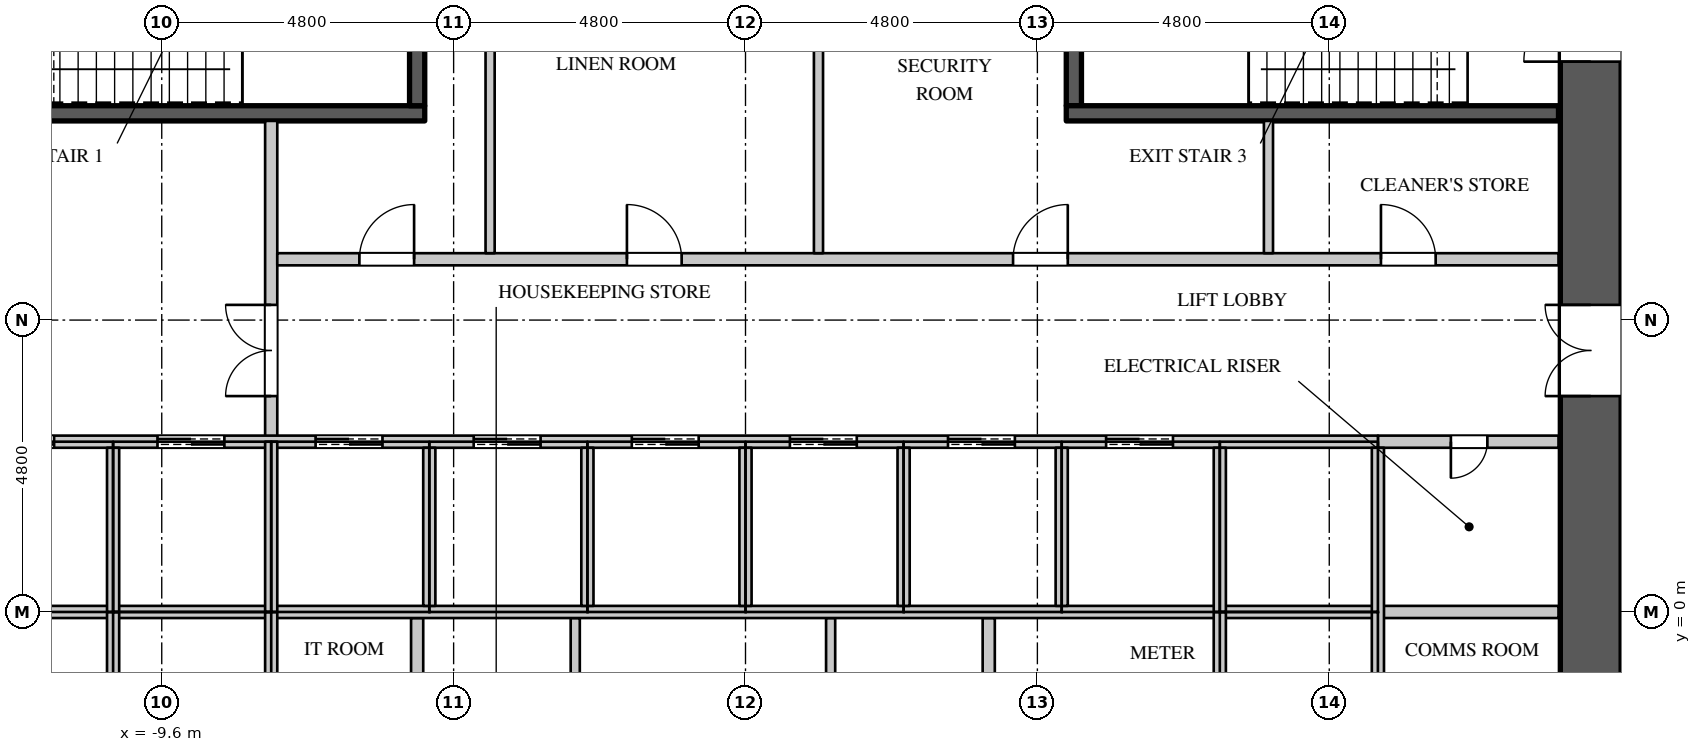
"""IFC4 building model, lengths in metres.
Left out: names, types, materials, properties, quantities, classifications, styles, units other than length and angle.
Written with IfcOpenShell. Run it as: python <this file> out.ifc"""

import sys

from ifc_helpers import new_model, si_unit, direction, frame, frame_2d, origin, place, context, subcontext, project, spatial, rectangle, extrude, element, fill, save


model = new_model("IFC4")
c1 = context("Model", 3, precision=1e-05, world=origin(), true_north=direction((0.0, 1.0)))
c2 = subcontext(c1, "Body", "Model", "MODEL_VIEW")
j1 = project(units=[si_unit("LENGTHUNIT", "METRE"), si_unit("PLANEANGLEUNIT", "RADIAN")], contexts=[c1])
p1 = place(None, origin())
s1 = spatial("IfcSite", under=j1, at=p1, CompositionType="ELEMENT")
p2 = place(p1, origin())
s2 = spatial("IfcBuilding", under=s1, at=p2, CompositionType="ELEMENT")
p3 = place(p2, frame((0.0, 0.0, 71.7)))
s3 = spatial("IfcBuildingStorey", under=s2, at=p3, CompositionType="ELEMENT", Elevation=71.7)
p4 = place(p3, frame((13.9, -11.0, 0.0), z_axis=(0.0, 0.0, 1.0), x_axis=(0.0, 1.0, 0.0)))
e1 = element("IfcWall", 1, at=p4, inside=s3, PredefinedType="SHEAR", context=c2, shape_type="SweptSolid", body=[
    extrude(rectangle(XDim=22.0, YDim=1.0, at=frame_2d((11.0, 0.0))), origin(), (0.0, 0.0, 1.0), 4.2),
])
p5 = place(p4, frame((20.05, 0.0, 0.0)))
e2 = element("IfcOpeningElement", 2, at=p5, cuts=e1, PredefinedType="OPENING", context=c2, shape_type="SweptSolid", body=[
    extrude(rectangle(XDim=1.1, YDim=2.2, at=frame_2d((0.55, 1.1))), frame((0.0, 0.51, 0.0), z_axis=(0.0, -1.0, 0.0), x_axis=(1.0, 0.0, 0.0)), (0.0, 0.0, 1.0), 1.02),
])
p6 = place(p4, frame((0.85, 0.0, 0.0)))
e3 = element("IfcOpeningElement", 3, at=p6, cuts=e1, PredefinedType="OPENING", context=c2, shape_type="SweptSolid", body=[
    extrude(rectangle(XDim=1.1, YDim=2.2, at=frame_2d((0.55, 1.1))), frame((0.0, 0.51, 0.0), z_axis=(0.0, -1.0, 0.0), x_axis=(1.0, 0.0, 0.0)), (0.0, 0.0, 1.0), 1.02),
])
p7 = place(p4, frame((14.55, 0.0, 0.0)))
e4 = element("IfcOpeningElement", 4, at=p7, cuts=e1, PredefinedType="OPENING", context=c2, shape_type="SweptSolid", body=[
    extrude(rectangle(XDim=1.5, YDim=2.4, at=frame_2d((0.75, 1.2))), frame((0.0, 0.51, 0.0), z_axis=(0.0, -1.0, 0.0), x_axis=(1.0, 0.0, 0.0)), (0.0, 0.0, 1.0), 1.02),
])
p8 = place(p4, frame((5.95, 0.0, 0.0)))
e5 = element("IfcOpeningElement", 5, at=p8, cuts=e1, PredefinedType="OPENING", context=c2, shape_type="SweptSolid", body=[
    extrude(rectangle(XDim=1.5, YDim=2.4, at=frame_2d((0.75, 1.2))), frame((0.0, 0.51, 0.0), z_axis=(0.0, -1.0, 0.0), x_axis=(1.0, 0.0, 0.0)), (0.0, 0.0, 1.0), 1.02),
])
p9 = place(p3, frame((-7.8, 2.8, 0.0), z_axis=(0.0, 0.0, 1.0), x_axis=(0.0, 1.0, 0.0)))
e6 = element("IfcWall", 6, at=p9, inside=s3, PredefinedType="PARTITIONING", context=c2, shape_type="SweptSolid", body=[
    extrude(rectangle(XDim=5.275, YDim=0.2, at=frame_2d((2.637, 0.0))), origin(), (0.0, 0.0, 1.0), 3.95),
])
p10 = place(p9, frame((0.75, 0.0, 0.0)))
e7 = element("IfcOpeningElement", 7, at=p10, cuts=e6, PredefinedType="OPENING", context=c2, shape_type="SweptSolid", body=[
    extrude(rectangle(XDim=1.5, YDim=2.4, at=frame_2d((0.75, 1.2))), frame((0.0, 0.11, 0.0), z_axis=(0.0, -1.0, 0.0), x_axis=(1.0, 0.0, 0.0)), (0.0, 0.0, 1.0), 0.22),
])
p11 = place(p3, frame((-7.7, 5.8, 0.0), z_axis=(0.0, 0.0, 1.0), x_axis=(1.0, 0.0, 0.0)))
e8 = element("IfcWall", 8, at=p11, inside=s3, PredefinedType="PARTITIONING", context=c2, shape_type="SweptSolid", body=[
    extrude(rectangle(XDim=21.07, YDim=0.2, at=frame_2d((10.535, 0.0))), origin(), (0.0, 0.0, 1.0), 3.95),
])
p12 = place(p11, frame((1.35, 0.0, 0.0)))
e9 = element("IfcOpeningElement", 9, at=p12, cuts=e8, PredefinedType="OPENING", context=c2, shape_type="SweptSolid", body=[
    extrude(rectangle(XDim=0.9, YDim=2.2, at=frame_2d((0.45, 1.1))), frame((0.0, 0.11, 0.0), z_axis=(0.0, -1.0, 0.0), x_axis=(1.0, 0.0, 0.0)), (0.0, 0.0, 1.0), 0.22),
])
p13 = place(p11, frame((5.75, 0.0, 0.0)))
e10 = element("IfcOpeningElement", 10, at=p13, cuts=e8, PredefinedType="OPENING", context=c2, shape_type="SweptSolid", body=[
    extrude(rectangle(XDim=0.9, YDim=2.2, at=frame_2d((0.45, 1.1))), frame((0.0, 0.11, 0.0), z_axis=(0.0, -1.0, 0.0), x_axis=(1.0, 0.0, 0.0)), (0.0, 0.0, 1.0), 0.22),
])
p14 = place(p11, frame((12.1, 0.0, 0.0)))
e11 = element("IfcOpeningElement", 11, at=p14, cuts=e8, PredefinedType="OPENING", context=c2, shape_type="SweptSolid", body=[
    extrude(rectangle(XDim=0.9, YDim=2.2, at=frame_2d((0.45, 1.1))), frame((0.0, 0.11, 0.0), z_axis=(0.0, -1.0, 0.0), x_axis=(1.0, 0.0, 0.0)), (0.0, 0.0, 1.0), 0.22),
])
p15 = place(p11, frame((18.15, 0.0, 0.0)))
e12 = element("IfcOpeningElement", 12, at=p15, cuts=e8, PredefinedType="OPENING", context=c2, shape_type="SweptSolid", body=[
    extrude(rectangle(XDim=0.9, YDim=2.2, at=frame_2d((0.45, 1.1))), frame((0.0, 0.11, 0.0), z_axis=(0.0, -1.0, 0.0), x_axis=(1.0, 0.0, 0.0)), (0.0, 0.0, 1.0), 0.22),
])
p16 = place(p3, frame((-4.2, 5.9, 0.0), z_axis=(0.0, 0.0, 1.0), x_axis=(0.0, 1.0, 0.0)))
e13 = element("IfcWall", 13, at=p16, inside=s3, PredefinedType="PARTITIONING", context=c2, shape_type="SweptSolid", body=[
    extrude(rectangle(XDim=5.07, YDim=0.15, at=frame_2d((2.535, 0.0))), origin(), (0.0, 0.0, 1.0), 3.95),
])
p17 = place(p3, frame((-2.8, -2.7, 0.0), z_axis=(0.0, 0.0, 1.0), x_axis=(0.0, 1.0, 0.0)))
e14 = element("IfcWall", 14, at=p17, inside=s3, PredefinedType="PARTITIONING", context=c2, shape_type="SweptSolid", body=[
    extrude(rectangle(XDim=2.6, YDim=0.15, at=frame_2d((1.3, 0.0))), origin(), (0.0, 0.0, 1.0), 3.95),
])
p18 = place(p3, frame((1.2, 5.9, 0.0), z_axis=(0.0, 0.0, 1.0), x_axis=(0.0, 1.0, 0.0)))
e15 = element("IfcWall", 15, at=p18, inside=s3, PredefinedType="PARTITIONING", context=c2, shape_type="SweptSolid", body=[
    extrude(rectangle(XDim=5.07, YDim=0.15, at=frame_2d((2.535, 0.0))), origin(), (0.0, 0.0, 1.0), 3.95),
])
p19 = place(p3, frame((1.4, -2.7, 0.0), z_axis=(0.0, 0.0, 1.0), x_axis=(0.0, 1.0, 0.0)))
e16 = element("IfcWall", 16, at=p19, inside=s3, PredefinedType="PARTITIONING", context=c2, shape_type="SweptSolid", body=[
    extrude(rectangle(XDim=2.6, YDim=0.15, at=frame_2d((1.3, 0.0))), origin(), (0.0, 0.0, 1.0), 3.95),
])
p20 = place(p3, frame((8.6, 5.9, 0.0), z_axis=(0.0, 0.0, 1.0), x_axis=(0.0, 1.0, 0.0)))
e17 = element("IfcWall", 17, at=p20, inside=s3, PredefinedType="PARTITIONING", context=c2, shape_type="SweptSolid", body=[
    extrude(rectangle(XDim=2.175, YDim=0.15, at=frame_2d((1.087, 0.0))), origin(), (0.0, 0.0, 1.0), 3.95),
])
for number, where, z_axis, x_axis in (
    (18, (-5.4, -2.7, 0.0), (0.0, 0.0, 1.0), (0.0, 1.0, 0.0)),
    (19, (4.0, -2.7, 0.0), (0.0, 0.0, 1.0), (0.0, 1.0, 0.0)),
):
    element("IfcWall", number, at=place(p3, frame(where, z_axis=z_axis, x_axis=x_axis)), inside=s3, PredefinedType="PARTITIONING", context=c2, shape_type="SweptSolid", body=[
        extrude(rectangle(XDim=2.6, YDim=0.2, at=frame_2d((1.3, 0.0))), origin(), (0.0, 0.0, 1.0), 3.95),
    ])
p21 = place(p3, frame((10.4, 2.8, 0.0), z_axis=(0.0, 0.0, 1.0), x_axis=(1.0, 0.0, 0.0)))
e20 = element("IfcWall", 20, at=p21, inside=s3, PredefinedType="PARTITIONING", context=c2, shape_type="SweptSolid", body=[
    extrude(rectangle(XDim=2.97, YDim=0.2, at=frame_2d((1.485, 0.0))), origin(), (0.0, 0.0, 1.0), 3.95),
])
p22 = place(p21, frame((1.2, 0.0, 0.0)))
e21 = element("IfcOpeningElement", 21, at=p22, cuts=e20, PredefinedType="OPENING", context=c2, shape_type="SweptSolid", body=[
    extrude(rectangle(XDim=0.6, YDim=2.0, at=frame_2d((0.3, 1.0))), frame((0.0, 0.11, 0.0), z_axis=(0.0, -1.0, 0.0), x_axis=(1.0, 0.0, 0.0)), (0.0, 0.0, 1.0), 0.22),
])
p23 = place(p3, frame((10.4, 0.0, 0.0), z_axis=(0.0, 0.0, 1.0), x_axis=(1.0, 0.0, 0.0)))
e22 = element("IfcWall", 22, at=p23, inside=s3, PredefinedType="PARTITIONING", context=c2, shape_type="SweptSolid", body=[
    extrude(rectangle(XDim=2.97, YDim=0.2, at=frame_2d((1.485, 0.0))), origin(), (0.0, 0.0, 1.0), 3.95),
])
p24 = place(p3, frame((-13.37, 0.0, 0.0), z_axis=(0.0, 0.0, 1.0), x_axis=(1.0, 0.0, 0.0)))
e23 = element("IfcWall", 23, at=p24, inside=s3, PredefinedType="PARTITIONING", context=c2, shape_type="SweptSolid", body=[
    extrude(rectangle(XDim=23.77, YDim=0.2, at=frame_2d((11.885, 0.0))), origin(), (0.0, 0.0, 1.0), 3.95),
])
p25 = place(p3, frame((-13.37, 2.8, 0.0), z_axis=(0.0, 0.0, 1.0), x_axis=(1.0, 0.0, 0.0)))
e24 = element("IfcWall", 24, at=p25, inside=s3, PredefinedType="PARTITIONING", context=c2, shape_type="SweptSolid", body=[
    extrude(rectangle(XDim=23.77, YDim=0.2, at=frame_2d((11.885, 0.0))), origin(), (0.0, 0.0, 1.0), 3.95),
])
p26 = place(p25, frame((0.9, 0.0, 0.0)))
e25 = element("IfcOpeningElement", 25, at=p26, cuts=e24, PredefinedType="OPENING", context=c2, shape_type="SweptSolid", body=[
    extrude(rectangle(XDim=1.1, YDim=2.2, at=frame_2d((0.55, 1.1))), frame((0.0, 0.11, 0.0), z_axis=(0.0, -1.0, 0.0), x_axis=(1.0, 0.0, 0.0)), (0.0, 0.0, 1.0), 0.22),
])
p27 = place(p25, frame((3.7, 0.0, 0.0)))
e26 = element("IfcOpeningElement", 26, at=p27, cuts=e24, PredefinedType="OPENING", context=c2, shape_type="SweptSolid", body=[
    extrude(rectangle(XDim=1.1, YDim=2.2, at=frame_2d((0.55, 1.1))), frame((0.0, 0.11, 0.0), z_axis=(0.0, -1.0, 0.0), x_axis=(1.0, 0.0, 0.0)), (0.0, 0.0, 1.0), 0.22),
])
p28 = place(p25, frame((6.3, 0.0, 0.0)))
e27 = element("IfcOpeningElement", 27, at=p28, cuts=e24, PredefinedType="OPENING", context=c2, shape_type="SweptSolid", body=[
    extrude(rectangle(XDim=1.1, YDim=2.2, at=frame_2d((0.55, 1.1))), frame((0.0, 0.11, 0.0), z_axis=(0.0, -1.0, 0.0), x_axis=(1.0, 0.0, 0.0)), (0.0, 0.0, 1.0), 0.22),
])
p29 = place(p25, frame((8.9, 0.0, 0.0)))
e28 = element("IfcOpeningElement", 28, at=p29, cuts=e24, PredefinedType="OPENING", context=c2, shape_type="SweptSolid", body=[
    extrude(rectangle(XDim=1.1, YDim=2.2, at=frame_2d((0.55, 1.1))), frame((0.0, 0.11, 0.0), z_axis=(0.0, -1.0, 0.0), x_axis=(1.0, 0.0, 0.0)), (0.0, 0.0, 1.0), 0.22),
])
p30 = place(p25, frame((11.5, 0.0, 0.0)))
e29 = element("IfcOpeningElement", 29, at=p30, cuts=e24, PredefinedType="OPENING", context=c2, shape_type="SweptSolid", body=[
    extrude(rectangle(XDim=1.1, YDim=2.2, at=frame_2d((0.55, 1.1))), frame((0.0, 0.11, 0.0), z_axis=(0.0, -1.0, 0.0), x_axis=(1.0, 0.0, 0.0)), (0.0, 0.0, 1.0), 0.22),
])
p31 = place(p25, frame((14.1, 0.0, 0.0)))
e30 = element("IfcOpeningElement", 30, at=p31, cuts=e24, PredefinedType="OPENING", context=c2, shape_type="SweptSolid", body=[
    extrude(rectangle(XDim=1.1, YDim=2.2, at=frame_2d((0.55, 1.1))), frame((0.0, 0.11, 0.0), z_axis=(0.0, -1.0, 0.0), x_axis=(1.0, 0.0, 0.0)), (0.0, 0.0, 1.0), 0.22),
])
p32 = place(p25, frame((16.7, 0.0, 0.0)))
e31 = element("IfcOpeningElement", 31, at=p32, cuts=e24, PredefinedType="OPENING", context=c2, shape_type="SweptSolid", body=[
    extrude(rectangle(XDim=1.1, YDim=2.2, at=frame_2d((0.55, 1.1))), frame((0.0, 0.11, 0.0), z_axis=(0.0, -1.0, 0.0), x_axis=(1.0, 0.0, 0.0)), (0.0, 0.0, 1.0), 0.22),
])
p33 = place(p25, frame((19.3, 0.0, 0.0)))
e32 = element("IfcOpeningElement", 32, at=p33, cuts=e24, PredefinedType="OPENING", context=c2, shape_type="SweptSolid", body=[
    extrude(rectangle(XDim=1.1, YDim=2.2, at=frame_2d((0.55, 1.1))), frame((0.0, 0.11, 0.0), z_axis=(0.0, -1.0, 0.0), x_axis=(1.0, 0.0, 0.0)), (0.0, 0.0, 1.0), 0.22),
])
for number, where, z_axis, x_axis in (
    (33, (-10.4, -2.7, 0.0), (0.0, 0.0, 1.0), (0.0, 1.0, 0.0)),
    (34, (-10.4, 0.0, 0.0), (0.0, 0.0, 1.0), (0.0, 1.0, 0.0)),
):
    element("IfcWall", number, at=place(p3, frame(where, z_axis=z_axis, x_axis=x_axis)), inside=s3, PredefinedType="PARTITIONING", context=c2, shape_type="SweptSolid", body=[
        extrude(rectangle(XDim=2.7, YDim=0.2, at=frame_2d((1.35, 0.0))), origin(), (0.0, 0.0, 1.0), 3.95),
    ])
for number, where, z_axis, x_axis in (
    (35, (-7.8, -2.8, 0.0), (0.0, 0.0, 1.0), (0.0, 1.0, 0.0)),
    (36, (-7.8, 0.0, 0.0), (0.0, 0.0, 1.0), (0.0, 1.0, 0.0)),
):
    element("IfcWall", number, at=place(p3, frame(where, z_axis=z_axis, x_axis=x_axis)), inside=s3, PredefinedType="PARTITIONING", context=c2, shape_type="SweptSolid", body=[
        extrude(rectangle(XDim=2.8, YDim=0.2, at=frame_2d((1.4, 0.0))), origin(), (0.0, 0.0, 1.0), 3.95),
    ])
for number, where, z_axis, x_axis in (
    (37, (-5.2, 0.1, 0.0), (0.0, 0.0, 1.0), (0.0, 1.0, 0.0)),
    (38, (-2.6, 0.1, 0.0), (0.0, 0.0, 1.0), (0.0, 1.0, 0.0)),
    (39, (0.0, 0.1, 0.0), (0.0, 0.0, 1.0), (0.0, 1.0, 0.0)),
    (40, (2.6, 0.1, 0.0), (0.0, 0.0, 1.0), (0.0, 1.0, 0.0)),
    (41, (5.2, 0.1, 0.0), (0.0, 0.0, 1.0), (0.0, 1.0, 0.0)),
):
    element("IfcWall", number, at=place(p3, frame(where, z_axis=z_axis, x_axis=x_axis)), inside=s3, PredefinedType="PARTITIONING", context=c2, shape_type="SweptSolid", body=[
        extrude(rectangle(XDim=2.6, YDim=0.2, at=frame_2d((1.3, 0.0))), origin(), (0.0, 0.0, 1.0), 3.95),
    ])
for number, where, z_axis, x_axis in (
    (42, (7.8, -2.7, 0.0), (0.0, 0.0, 1.0), (0.0, 1.0, 0.0)),
    (43, (7.8, 0.0, 0.0), (0.0, 0.0, 1.0), (0.0, 1.0, 0.0)),
):
    element("IfcWall", number, at=place(p3, frame(where, z_axis=z_axis, x_axis=x_axis)), inside=s3, PredefinedType="PARTITIONING", context=c2, shape_type="SweptSolid", body=[
        extrude(rectangle(XDim=2.7, YDim=0.2, at=frame_2d((1.35, 0.0))), origin(), (0.0, 0.0, 1.0), 3.95),
    ])
p34 = place(p3, frame((10.4, -2.7, 0.0), z_axis=(0.0, 0.0, 1.0), x_axis=(0.0, 1.0, 0.0)))
e44 = element("IfcWall", 44, at=p34, inside=s3, PredefinedType="PARTITIONING", context=c2, shape_type="SweptSolid", body=[
    extrude(rectangle(XDim=5.4, YDim=0.2, at=frame_2d((2.7, 0.0))), origin(), (0.0, 0.0, 1.0), 3.95),
])
p35 = place(p3, frame((-13.37, 8.2, 0.0), z_axis=(0.0, 0.0, 1.0), x_axis=(1.0, 0.0, 0.0)))
e45 = element("IfcWall", 45, at=p35, inside=s3, PredefinedType="SHEAR", context=c2, shape_type="SweptSolid", body=[
    extrude(rectangle(XDim=8.095, YDim=0.25, at=frame_2d((4.048, 0.0))), origin(), (0.0, 0.0, 1.0), 3.95),
])
p36 = place(p35, frame((0.15, 0.0, 0.0)))
e46 = element("IfcOpeningElement", 46, at=p36, cuts=e45, PredefinedType="OPENING", context=c2, shape_type="SweptSolid", body=[
    extrude(rectangle(XDim=1.1, YDim=2.2, at=frame_2d((0.55, 1.1))), frame((0.0, 0.135, 0.0), z_axis=(0.0, -1.0, 0.0), x_axis=(1.0, 0.0, 0.0)), (0.0, 0.0, 1.0), 0.27),
])
for number, where, z_axis, x_axis in (
    (47, (-5.4, 8.325, 0.0), (0.0, 0.0, 1.0), (0.0, 1.0, 0.0)),
    (48, (5.4, 8.325, 0.0), (0.0, 0.0, 1.0), (0.0, 1.0, 0.0)),
):
    element("IfcWall", number, at=place(p3, frame(where, z_axis=z_axis, x_axis=x_axis)), inside=s3, PredefinedType="SHEAR", context=c2, shape_type="SweptSolid", body=[
        extrude(rectangle(XDim=2.645, YDim=0.25, at=frame_2d((1.323, 0.0))), origin(), (0.0, 0.0, 1.0), 3.95),
    ])
p37 = place(p3, frame((5.275, 8.2, 0.0), z_axis=(0.0, 0.0, 1.0), x_axis=(1.0, 0.0, 0.0)))
e49 = element("IfcWall", 49, at=p37, inside=s3, PredefinedType="SHEAR", context=c2, shape_type="SweptSolid", body=[
    extrude(rectangle(XDim=8.095, YDim=0.25, at=frame_2d((4.048, 0.0))), origin(), (0.0, 0.0, 1.0), 3.95),
])
p38 = place(p22, origin())
e50 = element("IfcDoor", 50, at=p38, inside=s3, OperationType="SINGLE_SWING_RIGHT", PredefinedType="DOOR", context=c2, shape_type="SweptSolid", body=[
    extrude(rectangle(XDim=0.6, YDim=2.0, at=frame_2d((0.3, 1.0))), frame((0.0, 0.025, 0.0), z_axis=(0.0, -1.0, 0.0), x_axis=(1.0, 0.0, 0.0)), (0.0, 0.0, 1.0), 0.05),
])
fill(e21, e50)
p39 = place(p12, origin())
e51 = element("IfcDoor", 51, at=p39, inside=s3, OperationType="SINGLE_SWING_RIGHT", PredefinedType="DOOR", context=c2, shape_type="SweptSolid", body=[
    extrude(rectangle(XDim=0.9, YDim=2.2, at=frame_2d((0.45, 1.1))), frame((0.0, 0.025, 0.0), z_axis=(0.0, -1.0, 0.0), x_axis=(1.0, 0.0, 0.0)), (0.0, 0.0, 1.0), 0.05),
])
fill(e9, e51)
p40 = place(p13, origin())
e52 = element("IfcDoor", 52, at=p40, inside=s3, OperationType="SINGLE_SWING_LEFT", PredefinedType="DOOR", context=c2, shape_type="SweptSolid", body=[
    extrude(rectangle(XDim=0.9, YDim=2.2, at=frame_2d((0.45, 1.1))), frame((0.0, 0.025, 0.0), z_axis=(0.0, -1.0, 0.0), x_axis=(1.0, 0.0, 0.0)), (0.0, 0.0, 1.0), 0.05),
])
fill(e10, e52)
p41 = place(p14, origin())
e53 = element("IfcDoor", 53, at=p41, inside=s3, OperationType="SINGLE_SWING_RIGHT", PredefinedType="DOOR", context=c2, shape_type="SweptSolid", body=[
    extrude(rectangle(XDim=0.9, YDim=2.2, at=frame_2d((0.45, 1.1))), frame((0.0, 0.025, 0.0), z_axis=(0.0, -1.0, 0.0), x_axis=(1.0, 0.0, 0.0)), (0.0, 0.0, 1.0), 0.05),
])
fill(e11, e53)
p42 = place(p15, origin())
e54 = element("IfcDoor", 54, at=p42, inside=s3, OperationType="SINGLE_SWING_LEFT", PredefinedType="DOOR", context=c2, shape_type="SweptSolid", body=[
    extrude(rectangle(XDim=0.9, YDim=2.2, at=frame_2d((0.45, 1.1))), frame((0.0, 0.025, 0.0), z_axis=(0.0, -1.0, 0.0), x_axis=(1.0, 0.0, 0.0)), (0.0, 0.0, 1.0), 0.05),
])
fill(e12, e54)
p43 = place(p26, origin())
e55 = element("IfcDoor", 55, at=p43, inside=s3, OperationType="DOUBLE_DOOR_SLIDING", PredefinedType="DOOR", context=c2, shape_type="SweptSolid", body=[
    extrude(rectangle(XDim=1.1, YDim=2.2, at=frame_2d((0.55, 1.1))), frame((0.0, 0.025, 0.0), z_axis=(0.0, -1.0, 0.0), x_axis=(1.0, 0.0, 0.0)), (0.0, 0.0, 1.0), 0.05),
])
fill(e25, e55)
p44 = place(p27, origin())
e56 = element("IfcDoor", 56, at=p44, inside=s3, OperationType="DOUBLE_DOOR_SLIDING", PredefinedType="DOOR", context=c2, shape_type="SweptSolid", body=[
    extrude(rectangle(XDim=1.1, YDim=2.2, at=frame_2d((0.55, 1.1))), frame((0.0, 0.025, 0.0), z_axis=(0.0, -1.0, 0.0), x_axis=(1.0, 0.0, 0.0)), (0.0, 0.0, 1.0), 0.05),
])
fill(e26, e56)
p45 = place(p28, origin())
e57 = element("IfcDoor", 57, at=p45, inside=s3, OperationType="DOUBLE_DOOR_SLIDING", PredefinedType="DOOR", context=c2, shape_type="SweptSolid", body=[
    extrude(rectangle(XDim=1.1, YDim=2.2, at=frame_2d((0.55, 1.1))), frame((0.0, 0.025, 0.0), z_axis=(0.0, -1.0, 0.0), x_axis=(1.0, 0.0, 0.0)), (0.0, 0.0, 1.0), 0.05),
])
fill(e27, e57)
p46 = place(p29, origin())
e58 = element("IfcDoor", 58, at=p46, inside=s3, OperationType="DOUBLE_DOOR_SLIDING", PredefinedType="DOOR", context=c2, shape_type="SweptSolid", body=[
    extrude(rectangle(XDim=1.1, YDim=2.2, at=frame_2d((0.55, 1.1))), frame((0.0, 0.025, 0.0), z_axis=(0.0, -1.0, 0.0), x_axis=(1.0, 0.0, 0.0)), (0.0, 0.0, 1.0), 0.05),
])
fill(e28, e58)
p47 = place(p30, origin())
e59 = element("IfcDoor", 59, at=p47, inside=s3, OperationType="DOUBLE_DOOR_SLIDING", PredefinedType="DOOR", context=c2, shape_type="SweptSolid", body=[
    extrude(rectangle(XDim=1.1, YDim=2.2, at=frame_2d((0.55, 1.1))), frame((0.0, 0.025, 0.0), z_axis=(0.0, -1.0, 0.0), x_axis=(1.0, 0.0, 0.0)), (0.0, 0.0, 1.0), 0.05),
])
fill(e29, e59)
p48 = place(p31, origin())
e60 = element("IfcDoor", 60, at=p48, inside=s3, OperationType="DOUBLE_DOOR_SLIDING", PredefinedType="DOOR", context=c2, shape_type="SweptSolid", body=[
    extrude(rectangle(XDim=1.1, YDim=2.2, at=frame_2d((0.55, 1.1))), frame((0.0, 0.025, 0.0), z_axis=(0.0, -1.0, 0.0), x_axis=(1.0, 0.0, 0.0)), (0.0, 0.0, 1.0), 0.05),
])
fill(e30, e60)
p49 = place(p32, origin())
e61 = element("IfcDoor", 61, at=p49, inside=s3, OperationType="DOUBLE_DOOR_SLIDING", PredefinedType="DOOR", context=c2, shape_type="SweptSolid", body=[
    extrude(rectangle(XDim=1.1, YDim=2.2, at=frame_2d((0.55, 1.1))), frame((0.0, 0.025, 0.0), z_axis=(0.0, -1.0, 0.0), x_axis=(1.0, 0.0, 0.0)), (0.0, 0.0, 1.0), 0.05),
])
fill(e31, e61)
p50 = place(p33, origin())
e62 = element("IfcDoor", 62, at=p50, inside=s3, OperationType="DOUBLE_DOOR_SLIDING", PredefinedType="DOOR", context=c2, shape_type="SweptSolid", body=[
    extrude(rectangle(XDim=1.1, YDim=2.2, at=frame_2d((0.55, 1.1))), frame((0.0, 0.025, 0.0), z_axis=(0.0, -1.0, 0.0), x_axis=(1.0, 0.0, 0.0)), (0.0, 0.0, 1.0), 0.05),
])
fill(e32, e62)
p51 = place(p10, origin())
e63 = element("IfcDoor", 63, at=p51, inside=s3, OperationType="DOUBLE_DOOR_SINGLE_SWING", PredefinedType="DOOR", context=c2, shape_type="SweptSolid", body=[
    extrude(rectangle(XDim=1.5, YDim=2.4, at=frame_2d((0.75, 1.2))), frame((0.0, 0.025, 0.0), z_axis=(0.0, -1.0, 0.0), x_axis=(1.0, 0.0, 0.0)), (0.0, 0.0, 1.0), 0.05),
])
fill(e7, e63)
p52 = place(p5, origin())
e64 = element("IfcDoor", 64, at=p52, inside=s3, OperationType="SINGLE_SWING_LEFT", PredefinedType="DOOR", context=c2, shape_type="SweptSolid", body=[
    extrude(rectangle(XDim=1.1, YDim=2.2, at=frame_2d((0.55, 1.1))), frame((0.0, 0.495, 0.0), z_axis=(0.0, -1.0, 0.0), x_axis=(1.0, 0.0, 0.0)), (0.0, 0.0, 1.0), 0.05),
])
fill(e2, e64)
p53 = place(p7, origin())
e65 = element("IfcDoor", 65, at=p53, inside=s3, OperationType="DOUBLE_DOOR_SINGLE_SWING", PredefinedType="DOOR", context=c2, shape_type="SweptSolid", body=[
    extrude(rectangle(XDim=1.5, YDim=2.4, at=frame_2d((0.75, 1.2))), frame((0.0, 0.495, 0.0), z_axis=(0.0, -1.0, 0.0), x_axis=(1.0, 0.0, 0.0)), (0.0, 0.0, 1.0), 0.05),
])
fill(e4, e65)
save(model, sys.argv[1])
